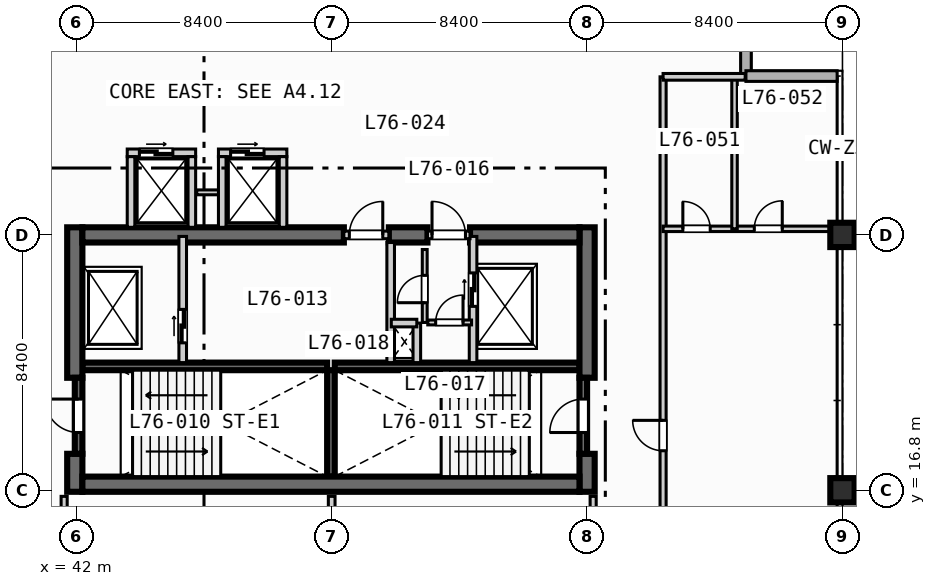
"""IFC4 building model, lengths in metres.
Left out: names, types, materials, properties, quantities, classifications, styles, units other than length and angle.
Written with IfcOpenShell. Run it as: python <this file> out.ifc"""

import sys

from ifc_helpers import new_model, si_unit, direction, frame, frame_2d, origin, origin_2d, place, context, subcontext, project, spatial, rectangle, extrude, element, fill, save


model = new_model("IFC4")
c1 = context("Model", 3, precision=1e-05, world=origin(), true_north=direction((0.0, 1.0)))
c2 = subcontext(c1, "Body", "Model", "MODEL_VIEW")
j1 = project(units=[si_unit("LENGTHUNIT", "METRE"), si_unit("PLANEANGLEUNIT", "RADIAN")], contexts=[c1])
p1 = place(None, origin())
s1 = spatial("IfcSite", under=j1, at=p1, CompositionType="ELEMENT")
p2 = place(p1, origin())
s2 = spatial("IfcBuilding", under=s1, at=p2, CompositionType="ELEMENT")
p3 = place(p2, frame((0.0, 0.0, 308.6)))
s3 = spatial("IfcBuildingStorey", under=s2, at=p3, CompositionType="ELEMENT", Elevation=308.6)
for number, where, z_axis, x_axis in (
    (1, (42.2, 20.875, 0.0), (0.0, 0.0, 1.0), (1.0, 0.0, 0.0)),
    (2, (50.5, 20.875, 0.0), (0.0, 0.0, 1.0), (1.0, 0.0, 0.0)),
):
    element("IfcWall", number, at=place(p3, frame(where, z_axis=z_axis, x_axis=x_axis)), inside=s3, PredefinedType="SOLIDWALL", context=c2, shape_type="SweptSolid", body=[
        extrude(rectangle(XDim=8.05, YDim=0.25, at=frame_2d((4.025, 0.0))), origin(), (0.0, 0.0, 1.0), 3.67),
    ])
p4 = place(p3, frame((50.375, 17.25, 0.0), z_axis=(0.0, 0.0, 1.0), x_axis=(0.0, 1.0, 0.0)))
e3 = element("IfcWall", 3, at=p4, inside=s3, PredefinedType="SOLIDWALL", context=c2, shape_type="SweptSolid", body=[
    extrude(rectangle(XDim=3.5, YDim=0.25, at=frame_2d((1.75, 0.0))), origin(), (0.0, 0.0, 1.0), 3.67),
])
p5 = place(p3, frame((41.95, 16.75, 0.0), z_axis=(0.0, 0.0, 1.0), x_axis=(0.0, 1.0, 0.0)))
e4 = element("IfcWall", 4, at=p5, inside=s3, PredefinedType="SHEAR", context=c2, shape_type="SweptSolid", body=[
    extrude(rectangle(XDim=1.25, YDim=0.5, at=frame_2d((0.625, 0.0))), origin(), (0.0, 0.0, 1.0), 3.67),
])
p6 = place(p3, frame((41.95, 20.5, 0.0), z_axis=(0.0, 0.0, 1.0), x_axis=(0.0, 1.0, 0.0)))
e5 = element("IfcWall", 5, at=p6, inside=s3, PredefinedType="SHEAR", context=c2, shape_type="SweptSolid", body=[
    extrude(rectangle(XDim=4.95, YDim=0.5, at=frame_2d((2.475, 0.0))), origin(), (0.0, 0.0, 1.0), 3.67),
])
p7 = place(p3, frame((58.8, 16.75, 0.0), z_axis=(0.0, 0.0, 1.0), x_axis=(0.0, 1.0, 0.0)))
e6 = element("IfcWall", 6, at=p7, inside=s3, PredefinedType="SHEAR", context=c2, shape_type="SweptSolid", body=[
    extrude(rectangle(XDim=1.25, YDim=0.5, at=frame_2d((0.625, 0.0))), origin(), (0.0, 0.0, 1.0), 3.67),
])
p8 = place(p3, frame((58.8, 20.5, 0.0), z_axis=(0.0, 0.0, 1.0), x_axis=(0.0, 1.0, 0.0)))
e7 = element("IfcWall", 7, at=p8, inside=s3, PredefinedType="SHEAR", context=c2, shape_type="SweptSolid", body=[
    extrude(rectangle(XDim=4.95, YDim=0.5, at=frame_2d((2.475, 0.0))), origin(), (0.0, 0.0, 1.0), 3.67),
])
p9 = place(p3, frame((42.2, 17.0, 0.0), z_axis=(0.0, 0.0, 1.0), x_axis=(1.0, 0.0, 0.0)))
e8 = element("IfcWall", 8, at=p9, inside=s3, PredefinedType="SHEAR", context=c2, shape_type="SweptSolid", body=[
    extrude(rectangle(XDim=16.35, YDim=0.5, at=frame_2d((8.175, 0.0))), origin(), (0.0, 0.0, 1.0), 3.67),
])
p10 = place(p3, frame((42.2, 25.2, 0.0), z_axis=(0.0, 0.0, 1.0), x_axis=(1.0, 0.0, 0.0)))
e9 = element("IfcWall", 9, at=p10, inside=s3, PredefinedType="SHEAR", context=c2, shape_type="SweptSolid", body=[
    extrude(rectangle(XDim=8.6, YDim=0.5, at=frame_2d((4.3, 0.0))), origin(), (0.0, 0.0, 1.0), 3.67),
])
p11 = place(p3, frame((52.28, 25.2, 0.0), z_axis=(0.0, 0.0, 1.0), x_axis=(1.0, 0.0, 0.0)))
e10 = element("IfcWall", 10, at=p11, inside=s3, PredefinedType="SHEAR", context=c2, shape_type="SweptSolid", body=[
    extrude(rectangle(XDim=1.27, YDim=0.5, at=frame_2d((0.635, 0.0))), origin(), (0.0, 0.0, 1.0), 3.67),
])
p12 = place(p3, frame((54.95, 25.2, 0.0), z_axis=(0.0, 0.0, 1.0), x_axis=(1.0, 0.0, 0.0)))
e11 = element("IfcWall", 11, at=p12, inside=s3, PredefinedType="SHEAR", context=c2, shape_type="SweptSolid", body=[
    extrude(rectangle(XDim=3.6, YDim=0.5, at=frame_2d((1.8, 0.0))), origin(), (0.0, 0.0, 1.0), 3.67),
])
for number, where, z_axis, x_axis in (
    (12, (67.2, 16.8, 0.0), (0.0, 0.0, 1.0), (1.0, 0.0, 0.0)),
    (13, (67.2, 25.2, 0.0), (0.0, 0.0, 1.0), (1.0, 0.0, 0.0)),
):
    element("IfcColumn", number, at=place(p3, frame(where, z_axis=z_axis, x_axis=x_axis)), inside=s3, PredefinedType="COLUMN", context=c2, shape_type="SweptSolid", body=[
        extrude(rectangle(XDim=0.8, YDim=0.8, at=origin_2d()), origin(), (0.0, 0.0, 1.0), 3.9),
    ])
for number, where, z_axis, x_axis in (
    (14, (64.025, 33.425, 0.0), (0.0, 0.0, 1.0), (0.0, -1.0, 0.0)),
    (15, (64.025, 30.425, 0.0), (0.0, 0.0, 1.0), (1.0, 0.0, 0.0)),
):
    element("IfcWall", number, at=place(p3, frame(where, z_axis=z_axis, x_axis=x_axis)), inside=s3, PredefinedType="STANDARD", context=c2, shape_type="SweptSolid", body=[
        extrude(rectangle(XDim=3.0, YDim=0.35, at=frame_2d((1.5, 0.0))), origin(), (0.0, 0.0, 1.0), 3.67),
    ])
p13 = place(p3, frame((42.075, 18.0, 0.0), z_axis=(0.0, 0.0, 1.0), x_axis=(0.0, 1.0, 0.0)))
e16 = element("IfcWall", 16, at=p13, inside=s3, PredefinedType="SOLIDWALL", context=c2, shape_type="SweptSolid", body=[
    extrude(rectangle(XDim=2.5, YDim=0.25, at=frame_2d((1.25, 0.0))), origin(), (0.0, 0.0, 1.0), 3.67),
])
p14 = place(p13, frame((0.7, 0.0, 0.0)))
e17 = element("IfcOpeningElement", 17, at=p14, cuts=e16, PredefinedType="OPENING", context=c2, shape_type="SweptSolid", body=[
    extrude(rectangle(XDim=1.1, YDim=2.15, at=frame_2d((0.55, 1.075))), frame((0.0, 0.135, 0.0), z_axis=(0.0, -1.0, 0.0), x_axis=(1.0, 0.0, 0.0)), (0.0, 0.0, 1.0), 0.27),
])
p15 = place(p3, frame((58.675, 18.0, 0.0), z_axis=(0.0, 0.0, 1.0), x_axis=(0.0, 1.0, 0.0)))
e18 = element("IfcWall", 18, at=p15, inside=s3, PredefinedType="SOLIDWALL", context=c2, shape_type="SweptSolid", body=[
    extrude(rectangle(XDim=2.5, YDim=0.25, at=frame_2d((1.25, 0.0))), origin(), (0.0, 0.0, 1.0), 3.67),
])
p16 = place(p15, frame((0.7, 0.0, 0.0)))
e19 = element("IfcOpeningElement", 19, at=p16, cuts=e18, PredefinedType="OPENING", context=c2, shape_type="SweptSolid", body=[
    extrude(rectangle(XDim=1.1, YDim=2.15, at=frame_2d((0.55, 1.075))), frame((0.0, 0.135, 0.0), z_axis=(0.0, -1.0, 0.0), x_axis=(1.0, 0.0, 0.0)), (0.0, 0.0, 1.0), 0.27),
])
p17 = place(p3, frame((45.5, 21.0, 0.0), z_axis=(0.0, 0.0, 1.0), x_axis=(0.0, 1.0, 0.0)))
e20 = element("IfcWall", 20, at=p17, inside=s3, PredefinedType="SOLIDWALL", context=c2, shape_type="SweptSolid", body=[
    extrude(rectangle(XDim=4.15, YDim=0.25, at=frame_2d((2.075, 0.0))), origin(), (0.0, 0.0, 1.0), 3.67),
])
p18 = place(p17, frame((0.65, 0.0, 0.0)))
e21 = element("IfcOpeningElement", 21, at=p18, cuts=e20, PredefinedType="OPENING", context=c2, shape_type="SweptSolid", body=[
    extrude(rectangle(XDim=1.1, YDim=2.15, at=frame_2d((0.55, 1.075))), frame((0.0, 0.135, 0.0), z_axis=(0.0, -1.0, 0.0), x_axis=(1.0, 0.0, 0.0)), (0.0, 0.0, 1.0), 0.27),
])
p19 = place(p3, frame((50.8, 25.2, 0.0), z_axis=(0.0, 0.0, 1.0), x_axis=(1.0, 0.0, 0.0)))
e22 = element("IfcWall", 22, at=p19, inside=s3, PredefinedType="SOLIDWALL", context=c2, shape_type="SweptSolid", body=[
    extrude(rectangle(XDim=1.48, YDim=0.25, at=frame_2d((0.74, 0.0))), origin(), (0.0, 0.0, 1.0), 3.67),
])
p20 = place(p19, frame((0.18, 0.0, 0.0)))
e23 = element("IfcOpeningElement", 23, at=p20, cuts=e22, PredefinedType="OPENING", context=c2, shape_type="SweptSolid", body=[
    extrude(rectangle(XDim=1.1, YDim=2.15, at=frame_2d((0.55, 1.075))), frame((0.0, 0.135, 0.0), z_axis=(0.0, -1.0, 0.0), x_axis=(1.0, 0.0, 0.0)), (0.0, 0.0, 1.0), 0.27),
])
p21 = place(p3, frame((52.34, 21.0, 0.0), z_axis=(0.0, 0.0, 1.0), x_axis=(0.0, 1.0, 0.0)))
e24 = element("IfcWall", 24, at=p21, inside=s3, PredefinedType="SOLIDWALL", context=c2, shape_type="SweptSolid", body=[
    extrude(rectangle(XDim=3.95, YDim=0.25, at=frame_2d((1.975, 0.0))), origin(), (0.0, 0.0, 1.0), 3.67),
])
p22 = place(p3, frame((55.05, 21.0, 0.0), z_axis=(0.0, 0.0, 1.0), x_axis=(0.0, 1.0, 0.0)))
e25 = element("IfcWall", 25, at=p22, inside=s3, PredefinedType="SOLIDWALL", context=c2, shape_type="SweptSolid", body=[
    extrude(rectangle(XDim=4.15, YDim=0.25, at=frame_2d((2.075, 0.0))), origin(), (0.0, 0.0, 1.0), 3.67),
])
p23 = place(p22, frame((1.85, 0.0, 0.0)))
e26 = element("IfcOpeningElement", 26, at=p23, cuts=e25, PredefinedType="OPENING", context=c2, shape_type="SweptSolid", body=[
    extrude(rectangle(XDim=1.1, YDim=2.15, at=frame_2d((0.55, 1.075))), frame((0.0, 0.135, 0.0), z_axis=(0.0, -1.0, 0.0), x_axis=(1.0, 0.0, 0.0)), (0.0, 0.0, 1.0), 0.27),
])
p24 = place(p3, frame((53.55, 25.2, 0.0), z_axis=(0.0, 0.0, 1.0), x_axis=(1.0, 0.0, 0.0)))
e27 = element("IfcWall", 27, at=p24, inside=s3, PredefinedType="SOLIDWALL", context=c2, shape_type="SweptSolid", body=[
    extrude(rectangle(XDim=1.4, YDim=0.25, at=frame_2d((0.7, 0.0))), origin(), (0.0, 0.0, 1.0), 3.67),
])
p25 = place(p24, frame((0.15, 0.0, 0.0)))
e28 = element("IfcOpeningElement", 28, at=p25, cuts=e27, PredefinedType="OPENING", context=c2, shape_type="SweptSolid", body=[
    extrude(rectangle(XDim=1.1, YDim=2.15, at=frame_2d((0.55, 1.075))), frame((0.0, 0.135, 0.0), z_axis=(0.0, -1.0, 0.0), x_axis=(1.0, 0.0, 0.0)), (0.0, 0.0, 1.0), 0.27),
])
p26 = place(p3, frame((53.2, 21.0, 0.0), z_axis=(0.0, 0.0, 1.0), x_axis=(0.0, 1.0, 0.0)))
e29 = element("IfcWall", 29, at=p26, inside=s3, PredefinedType="SOLIDWALL", context=c2, shape_type="SweptSolid", body=[
    extrude(rectangle(XDim=1.3, YDim=0.25, at=frame_2d((0.65, 0.0))), origin(), (0.0, 0.0, 1.0), 3.67),
])
p27 = place(p3, frame((52.36, 22.3, 0.0), z_axis=(0.0, 0.0, 1.0), x_axis=(1.0, 0.0, 0.0)))
e30 = element("IfcWall", 30, at=p27, inside=s3, PredefinedType="SOLIDWALL", context=c2, shape_type="SweptSolid", body=[
    extrude(rectangle(XDim=0.84, YDim=0.25, at=frame_2d((0.42, 0.0))), origin(), (0.0, 0.0, 1.0), 3.67),
])
p28 = place(p3, frame((53.56, 22.32, 0.0), z_axis=(0.0, 0.0, 1.0), x_axis=(1.0, 0.0, 0.0)))
e31 = element("IfcWall", 31, at=p28, inside=s3, PredefinedType="PARTITIONING", context=c2, shape_type="SweptSolid", body=[
    extrude(rectangle(XDim=1.44, YDim=0.16, at=frame_2d((0.72, 0.0))), origin(), (0.0, 0.0, 1.0), 3.67),
])
p29 = place(p28, frame((0.26, 0.0, 0.0)))
e32 = element("IfcOpeningElement", 32, at=p29, cuts=e31, PredefinedType="OPENING", context=c2, shape_type="SweptSolid", body=[
    extrude(rectangle(XDim=0.9, YDim=2.1, at=frame_2d((0.45, 1.05))), frame((0.0, 0.09, 0.0), z_axis=(0.0, -1.0, 0.0), x_axis=(1.0, 0.0, 0.0)), (0.0, 0.0, 1.0), 0.18),
])
p30 = place(p3, frame((53.46, 22.32, 0.0), z_axis=(0.0, 0.0, 1.0), x_axis=(0.0, 1.0, 0.0)))
e33 = element("IfcWall", 33, at=p30, inside=s3, PredefinedType="PARTITIONING", context=c2, shape_type="SweptSolid", body=[
    extrude(rectangle(XDim=2.4, YDim=0.16, at=frame_2d((1.2, 0.0))), origin(), (0.0, 0.0, 1.0), 3.67),
])
p31 = place(p30, frame((0.65, 0.0, 0.0)))
e34 = element("IfcOpeningElement", 34, at=p31, cuts=e33, PredefinedType="OPENING", context=c2, shape_type="SweptSolid", body=[
    extrude(rectangle(XDim=0.9, YDim=2.1, at=frame_2d((0.45, 1.05))), frame((0.0, 0.09, 0.0), z_axis=(0.0, -1.0, 0.0), x_axis=(1.0, 0.0, 0.0)), (0.0, 0.0, 1.0), 0.18),
])
p32 = place(p3, frame((43.675, 27.9, 0.0), z_axis=(0.0, 0.0, 1.0), x_axis=(1.0, 0.0, 0.0)))
e35 = element("IfcWall", 35, at=p32, inside=s3, PredefinedType="SOLIDWALL", context=c2, shape_type="SweptSolid", body=[
    extrude(rectangle(XDim=2.25, YDim=0.25, at=frame_2d((1.125, 0.0))), origin(), (0.0, 0.0, 1.0), 3.67),
])
p33 = place(p32, frame((0.4, 0.0, 0.0)))
e36 = element("IfcOpeningElement", 36, at=p33, cuts=e35, PredefinedType="OPENING", context=c2, shape_type="SweptSolid", body=[
    extrude(rectangle(XDim=1.1, YDim=2.15, at=frame_2d((0.55, 1.075))), frame((0.0, 0.135, 0.0), z_axis=(0.0, -1.0, 0.0), x_axis=(1.0, 0.0, 0.0)), (0.0, 0.0, 1.0), 0.27),
])
for number, where, z_axis, x_axis in (
    (37, (43.8, 25.45, 0.0), (0.0, 0.0, 1.0), (0.0, 1.0, 0.0)),
    (38, (45.8, 25.45, 0.0), (0.0, 0.0, 1.0), (0.0, 1.0, 0.0)),
):
    element("IfcWall", number, at=place(p3, frame(where, z_axis=z_axis, x_axis=x_axis)), inside=s3, PredefinedType="SOLIDWALL", context=c2, shape_type="SweptSolid", body=[
        extrude(rectangle(XDim=2.325, YDim=0.25, at=frame_2d((1.163, 0.0))), origin(), (0.0, 0.0, 1.0), 3.67),
    ])
p34 = place(p3, frame((45.96, 26.6, 0.0), z_axis=(0.0, 0.0, 1.0), x_axis=(1.0, 0.0, 0.0)))
e39 = element("IfcWall", 39, at=p34, inside=s3, PredefinedType="PARTITIONING", context=c2, shape_type="SweptSolid", body=[
    extrude(rectangle(XDim=0.88, YDim=0.16, at=frame_2d((0.44, 0.0))), origin(), (0.0, 0.0, 1.0), 3.67),
])
p35 = place(p3, frame((46.675, 27.9, 0.0), z_axis=(0.0, 0.0, 1.0), x_axis=(1.0, 0.0, 0.0)))
e40 = element("IfcWall", 40, at=p35, inside=s3, PredefinedType="SOLIDWALL", context=c2, shape_type="SweptSolid", body=[
    extrude(rectangle(XDim=2.25, YDim=0.25, at=frame_2d((1.125, 0.0))), origin(), (0.0, 0.0, 1.0), 3.67),
])
p36 = place(p35, frame((0.4, 0.0, 0.0)))
e41 = element("IfcOpeningElement", 41, at=p36, cuts=e40, PredefinedType="OPENING", context=c2, shape_type="SweptSolid", body=[
    extrude(rectangle(XDim=1.1, YDim=2.15, at=frame_2d((0.55, 1.075))), frame((0.0, 0.135, 0.0), z_axis=(0.0, -1.0, 0.0), x_axis=(1.0, 0.0, 0.0)), (0.0, 0.0, 1.0), 0.27),
])
for number, where, z_axis, x_axis in (
    (42, (46.8, 25.45, 0.0), (0.0, 0.0, 1.0), (0.0, 1.0, 0.0)),
    (43, (48.8, 25.45, 0.0), (0.0, 0.0, 1.0), (0.0, 1.0, 0.0)),
):
    element("IfcWall", number, at=place(p3, frame(where, z_axis=z_axis, x_axis=x_axis)), inside=s3, PredefinedType="SOLIDWALL", context=c2, shape_type="SweptSolid", body=[
        extrude(rectangle(XDim=2.325, YDim=0.25, at=frame_2d((1.163, 0.0))), origin(), (0.0, 0.0, 1.0), 3.67),
    ])
p37 = place(p3, frame((41.6, 8.65, 0.0), z_axis=(0.0, 0.0, 1.0), x_axis=(0.0, 1.0, 0.0)))
e44 = element("IfcWall", 44, at=p37, inside=s3, PredefinedType="PARTITIONING", context=c2, shape_type="SweptSolid", body=[
    extrude(rectangle(XDim=7.95, YDim=0.2, at=frame_2d((3.975, 0.0))), origin(), (0.0, 0.0, 1.0), 3.67),
])
p38 = place(p37, frame((2.2, 0.0, 0.0)))
e45 = element("IfcOpeningElement", 45, at=p38, cuts=e44, PredefinedType="OPENING", context=c2, shape_type="SweptSolid", body=[
    extrude(rectangle(XDim=0.92, YDim=2.1, at=frame_2d((0.46, 1.05))), frame((0.0, 0.11, 0.0), z_axis=(0.0, -1.0, 0.0), x_axis=(1.0, 0.0, 0.0)), (0.0, 0.0, 1.0), 0.22),
])
p39 = place(p3, frame((59.0, 8.65, 0.0), z_axis=(0.0, 0.0, 1.0), x_axis=(0.0, 1.0, 0.0)))
e46 = element("IfcWall", 46, at=p39, inside=s3, PredefinedType="PARTITIONING", context=c2, shape_type="SweptSolid", body=[
    extrude(rectangle(XDim=7.95, YDim=0.2, at=frame_2d((3.975, 0.0))), origin(), (0.0, 0.0, 1.0), 3.131),
])
p40 = place(p39, frame((2.2, 0.0, 0.0)))
e47 = element("IfcOpeningElement", 47, at=p40, cuts=e46, PredefinedType="OPENING", context=c2, shape_type="SweptSolid", body=[
    extrude(rectangle(XDim=0.92, YDim=2.1, at=frame_2d((0.46, 1.05))), frame((0.0, 0.11, 0.0), z_axis=(0.0, -1.0, 0.0), x_axis=(1.0, 0.0, 0.0)), (0.0, 0.0, 1.0), 0.22),
])
p41 = place(p3, frame((50.4, 8.65, 0.0), z_axis=(0.0, 0.0, 1.0), x_axis=(0.0, 1.0, 0.0)))
e48 = element("IfcWall", 48, at=p41, inside=s3, PredefinedType="PARTITIONING", context=c2, shape_type="SweptSolid", body=[
    extrude(rectangle(XDim=7.95, YDim=0.22, at=frame_2d((3.975, 0.0))), origin(), (0.0, 0.0, 1.0), 3.07),
])
p42 = place(p3, frame((61.3, 11.6, 0.0), z_axis=(0.0, 0.0, 1.0), x_axis=(0.0, 1.0, 0.0)))
e49 = element("IfcWall", 49, at=p42, inside=s3, PredefinedType="PARTITIONING", context=c2, shape_type="SweptSolid", body=[
    extrude(rectangle(XDim=18.8, YDim=0.2, at=frame_2d((9.4, 0.0))), origin(), (0.0, 0.0, 1.0), 3.67),
])
p43 = place(p42, frame((6.5, 0.0, 0.0)))
e50 = element("IfcOpeningElement", 50, at=p43, cuts=e49, PredefinedType="OPENING", context=c2, shape_type="SweptSolid", body=[
    extrude(rectangle(XDim=1.0, YDim=2.15, at=frame_2d((0.5, 1.075))), frame((0.0, 0.11, 0.0), z_axis=(0.0, -1.0, 0.0), x_axis=(1.0, 0.0, 0.0)), (0.0, 0.0, 1.0), 0.22),
])
p44 = place(p3, frame((61.3, 25.4, 0.0), z_axis=(0.0, 0.0, 1.0), x_axis=(1.0, 0.0, 0.0)))
e51 = element("IfcWall", 51, at=p44, inside=s3, PredefinedType="PLUMBINGWALL", context=c2, shape_type="SweptSolid", body=[
    extrude(rectangle(XDim=5.5, YDim=0.18, at=frame_2d((2.75, 0.0))), origin(), (0.0, 0.0, 1.0), 3.07),
])
p45 = place(p44, frame((0.65, 0.0, 0.0)))
e52 = element("IfcOpeningElement", 52, at=p45, cuts=e51, PredefinedType="OPENING", context=c2, shape_type="SweptSolid", body=[
    extrude(rectangle(XDim=0.9, YDim=2.1, at=frame_2d((0.45, 1.05))), frame((0.0, 0.1, 0.0), z_axis=(0.0, -1.0, 0.0), x_axis=(1.0, 0.0, 0.0)), (0.0, 0.0, 1.0), 0.2),
])
p46 = place(p44, frame((3.0, 0.0, 0.0)))
e53 = element("IfcOpeningElement", 53, at=p46, cuts=e51, PredefinedType="OPENING", context=c2, shape_type="SweptSolid", body=[
    extrude(rectangle(XDim=0.92, YDim=2.1, at=frame_2d((0.46, 1.05))), frame((0.0, 0.1, 0.0), z_axis=(0.0, -1.0, 0.0), x_axis=(1.0, 0.0, 0.0)), (0.0, 0.0, 1.0), 0.2),
])
p47 = place(p3, frame((63.65, 25.4, 0.0), z_axis=(0.0, 0.0, 1.0), x_axis=(0.0, 1.0, 0.0)))
e54 = element("IfcWall", 54, at=p47, inside=s3, PredefinedType="PLUMBINGWALL", context=c2, shape_type="SweptSolid", body=[
    extrude(rectangle(XDim=5.0, YDim=0.18, at=frame_2d((2.5, 0.0))), origin(), (0.0, 0.0, 1.0), 3.67),
])
p48 = place(p3, frame((61.3, 30.4, 0.0), z_axis=(0.0, 0.0, 1.0), x_axis=(1.0, 0.0, 0.0)))
e55 = element("IfcWall", 55, at=p48, inside=s3, PredefinedType="PARTITIONING", context=c2, shape_type="SweptSolid", body=[
    extrude(rectangle(XDim=2.7, YDim=0.22, at=frame_2d((1.35, 0.0))), origin(), (0.0, 0.0, 1.0), 3.67),
])
p49 = place(p14, origin())
e56 = element("IfcDoor", 56, at=p49, inside=s3, OperationType="SINGLE_SWING_RIGHT", PredefinedType="DOOR", context=c2, shape_type="SweptSolid", body=[
    extrude(rectangle(XDim=1.1, YDim=2.15, at=frame_2d((0.55, 1.075))), frame((0.0, 0.025, 0.0), z_axis=(0.0, -1.0, 0.0), x_axis=(1.0, 0.0, 0.0)), (0.0, 0.0, 1.0), 0.05),
])
fill(e17, e56)
p50 = place(p16, origin())
e57 = element("IfcDoor", 57, at=p50, inside=s3, OperationType="SINGLE_SWING_LEFT", PredefinedType="DOOR", context=c2, shape_type="SweptSolid", body=[
    extrude(rectangle(XDim=1.1, YDim=2.15, at=frame_2d((0.55, 1.075))), frame((0.0, 0.025, 0.0), z_axis=(0.0, -1.0, 0.0), x_axis=(1.0, 0.0, 0.0)), (0.0, 0.0, 1.0), 0.05),
])
fill(e19, e57)
p51 = place(p18, origin())
e58 = element("IfcDoor", 58, at=p51, inside=s3, OperationType="SLIDING_TO_LEFT", PredefinedType="DOOR", context=c2, shape_type="SweptSolid", body=[
    extrude(rectangle(XDim=1.1, YDim=2.15, at=frame_2d((0.55, 1.075))), frame((0.0, 0.025, 0.0), z_axis=(0.0, -1.0, 0.0), x_axis=(1.0, 0.0, 0.0)), (0.0, 0.0, 1.0), 0.05),
])
fill(e21, e58)
p52 = place(p20, origin())
e59 = element("IfcDoor", 59, at=p52, inside=s3, OperationType="SINGLE_SWING_RIGHT", PredefinedType="DOOR", context=c2, shape_type="SweptSolid", body=[
    extrude(rectangle(XDim=1.1, YDim=2.15, at=frame_2d((0.55, 1.075))), frame((0.0, 0.025, 0.0), z_axis=(0.0, -1.0, 0.0), x_axis=(1.0, 0.0, 0.0)), (0.0, 0.0, 1.0), 0.05),
])
fill(e23, e59)
p53 = place(p23, origin())
e60 = element("IfcDoor", 60, at=p53, inside=s3, OperationType="SLIDING_TO_LEFT", PredefinedType="DOOR", context=c2, shape_type="SweptSolid", body=[
    extrude(rectangle(XDim=1.1, YDim=2.15, at=frame_2d((0.55, 1.075))), frame((0.0, 0.025, 0.0), z_axis=(0.0, -1.0, 0.0), x_axis=(1.0, 0.0, 0.0)), (0.0, 0.0, 1.0), 0.05),
])
fill(e26, e60)
p54 = place(p25, origin())
e61 = element("IfcDoor", 61, at=p54, inside=s3, OperationType="SINGLE_SWING_LEFT", PredefinedType="DOOR", context=c2, shape_type="SweptSolid", body=[
    extrude(rectangle(XDim=1.1, YDim=2.15, at=frame_2d((0.55, 1.075))), frame((0.0, 0.025, 0.0), z_axis=(0.0, -1.0, 0.0), x_axis=(1.0, 0.0, 0.0)), (0.0, 0.0, 1.0), 0.05),
])
fill(e28, e61)
p55 = place(p29, origin())
e62 = element("IfcDoor", 62, at=p55, inside=s3, OperationType="SINGLE_SWING_RIGHT", PredefinedType="DOOR", context=c2, shape_type="SweptSolid", body=[
    extrude(rectangle(XDim=0.9, YDim=2.1, at=frame_2d((0.45, 1.05))), frame((0.0, 0.025, 0.0), z_axis=(0.0, -1.0, 0.0), x_axis=(1.0, 0.0, 0.0)), (0.0, 0.0, 1.0), 0.05),
])
fill(e32, e62)
p56 = place(p31, origin())
e63 = element("IfcDoor", 63, at=p56, inside=s3, OperationType="SINGLE_SWING_LEFT", PredefinedType="DOOR", context=c2, shape_type="SweptSolid", body=[
    extrude(rectangle(XDim=0.9, YDim=2.1, at=frame_2d((0.45, 1.05))), frame((0.0, 0.025, 0.0), z_axis=(0.0, -1.0, 0.0), x_axis=(1.0, 0.0, 0.0)), (0.0, 0.0, 1.0), 0.05),
])
fill(e34, e63)
p57 = place(p33, origin())
e64 = element("IfcDoor", 64, at=p57, inside=s3, OperationType="SLIDING_TO_LEFT", PredefinedType="DOOR", context=c2, shape_type="SweptSolid", body=[
    extrude(rectangle(XDim=1.1, YDim=2.15, at=frame_2d((0.55, 1.075))), frame((0.0, 0.025, 0.0), z_axis=(0.0, -1.0, 0.0), x_axis=(1.0, 0.0, 0.0)), (0.0, 0.0, 1.0), 0.05),
])
fill(e36, e64)
p58 = place(p36, origin())
e65 = element("IfcDoor", 65, at=p58, inside=s3, OperationType="SLIDING_TO_LEFT", PredefinedType="DOOR", context=c2, shape_type="SweptSolid", body=[
    extrude(rectangle(XDim=1.1, YDim=2.15, at=frame_2d((0.55, 1.075))), frame((0.0, 0.025, 0.0), z_axis=(0.0, -1.0, 0.0), x_axis=(1.0, 0.0, 0.0)), (0.0, 0.0, 1.0), 0.05),
])
fill(e41, e65)
p59 = place(p43, origin())
e66 = element("IfcDoor", 66, at=p59, inside=s3, OperationType="SINGLE_SWING_RIGHT", PredefinedType="DOOR", context=c2, shape_type="SweptSolid", body=[
    extrude(rectangle(XDim=1.0, YDim=2.15, at=frame_2d((0.5, 1.075))), frame((0.0, 0.025, 0.0), z_axis=(0.0, -1.0, 0.0), x_axis=(1.0, 0.0, 0.0)), (0.0, 0.0, 1.0), 0.05),
])
fill(e50, e66)
p60 = place(p45, origin())
e67 = element("IfcDoor", 67, at=p60, inside=s3, OperationType="SINGLE_SWING_LEFT", PredefinedType="DOOR", context=c2, shape_type="SweptSolid", body=[
    extrude(rectangle(XDim=0.9, YDim=2.1, at=frame_2d((0.45, 1.05))), frame((0.0, 0.025, 0.0), z_axis=(0.0, -1.0, 0.0), x_axis=(1.0, 0.0, 0.0)), (0.0, 0.0, 1.0), 0.05),
])
fill(e52, e67)
p61 = place(p46, origin())
e68 = element("IfcDoor", 68, at=p61, inside=s3, OperationType="SINGLE_SWING_RIGHT", PredefinedType="DOOR", context=c2, shape_type="SweptSolid", body=[
    extrude(rectangle(XDim=0.92, YDim=2.1, at=frame_2d((0.46, 1.05))), frame((0.0, 0.025, 0.0), z_axis=(0.0, -1.0, 0.0), x_axis=(1.0, 0.0, 0.0)), (0.0, 0.0, 1.0), 0.05),
])
fill(e53, e68)
save(model, sys.argv[1])
